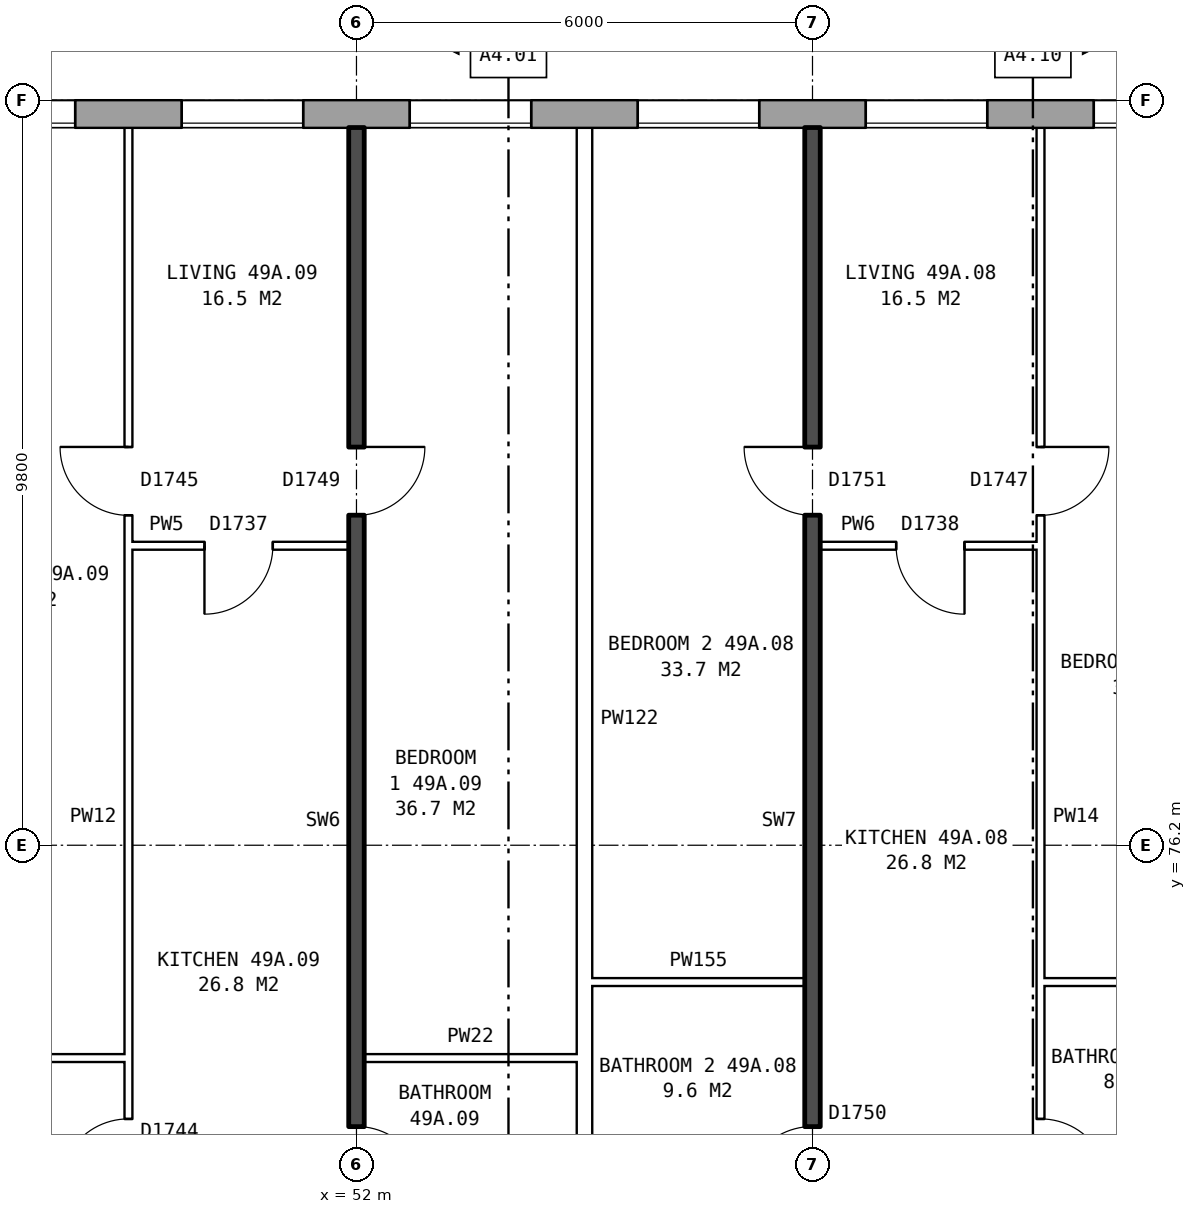
"""IFC4 building model, lengths in metres.
Left out: names, types, materials, properties, quantities, classifications, styles, units other than length and angle.
Written with IfcOpenShell. Run it as: python <this file> out.ifc"""

import sys

from ifc_helpers import new_model, si_unit, direction, frame, frame_2d, origin, place, context, subcontext, project, spatial, rectangle, extrude, element, fill, save


model = new_model("IFC4")
c1 = context("Model", 3, precision=1e-05, world=origin(), true_north=direction((0.0, 1.0)))
c2 = subcontext(c1, "Body", "Model", "MODEL_VIEW")
j1 = project(units=[si_unit("LENGTHUNIT", "METRE"), si_unit("PLANEANGLEUNIT", "RADIAN")], contexts=[c1])
p1 = place(None, origin())
s1 = spatial("IfcSite", under=j1, at=p1, CompositionType="ELEMENT")
p2 = place(p1, origin())
s2 = spatial("IfcBuilding", under=s1, at=p2, CompositionType="ELEMENT")
p3 = place(p2, frame((0.0, 0.0, 175.8)))
s3 = spatial("IfcBuildingStorey", under=s2, at=p3, CompositionType="ELEMENT", Elevation=175.8)
p4 = place(p3, frame((72.925, 85.82, 0.0), z_axis=(0.0, 0.0, 1.0), x_axis=(-1.0, 0.0, 0.0)))
e1 = element("IfcWall", 1, at=p4, inside=s3, PredefinedType="STANDARD", context=c2, shape_type="SweptSolid", body=[
    extrude(rectangle(XDim=39.601, YDim=0.36, at=frame_2d((19.8, 0.0))), origin(), (0.0, 0.0, 1.0), 2.85),
])
p5 = place(p4, frame((0.3, 0.0, 0.8)))
e2 = element("IfcOpeningElement", 2, at=p5, cuts=e1, PredefinedType="OPENING", context=c2, shape_type="SweptSolid", body=[
    extrude(rectangle(XDim=1.2, YDim=1.8, at=frame_2d((0.6, 0.9))), frame((0.0, 0.19, 0.0), z_axis=(0.0, -1.0, 0.0), x_axis=(1.0, 0.0, 0.0)), (0.0, 0.0, 1.0), 0.38),
])
p6 = place(p4, frame((3.675, 0.0, 0.8)))
e3 = element("IfcOpeningElement", 3, at=p6, cuts=e1, PredefinedType="OPENING", context=c2, shape_type="SweptSolid", body=[
    extrude(rectangle(XDim=0.6, YDim=0.9, at=frame_2d((0.3, 0.45))), frame((0.0, 0.19, 0.0), z_axis=(0.0, -1.0, 0.0), x_axis=(1.0, 0.0, 0.0)), (0.0, 0.0, 1.0), 0.38),
])
p7 = place(p4, frame((6.625, 0.0, 0.8)))
e4 = element("IfcOpeningElement", 4, at=p7, cuts=e1, PredefinedType="OPENING", context=c2, shape_type="SweptSolid", body=[
    extrude(rectangle(XDim=1.6, YDim=1.8, at=frame_2d((0.8, 0.9))), frame((0.0, 0.19, 0.0), z_axis=(0.0, -1.0, 0.0), x_axis=(1.0, 0.0, 0.0)), (0.0, 0.0, 1.0), 0.38),
])
p8 = place(p4, frame((9.625, 0.0, 0.8)))
e5 = element("IfcOpeningElement", 5, at=p8, cuts=e1, PredefinedType="OPENING", context=c2, shape_type="SweptSolid", body=[
    extrude(rectangle(XDim=1.6, YDim=1.8, at=frame_2d((0.8, 0.9))), frame((0.0, 0.19, 0.0), z_axis=(0.0, -1.0, 0.0), x_axis=(1.0, 0.0, 0.0)), (0.0, 0.0, 1.0), 0.38),
])
p9 = place(p4, frame((12.625, 0.0, 0.8)))
e6 = element("IfcOpeningElement", 6, at=p9, cuts=e1, PredefinedType="OPENING", context=c2, shape_type="SweptSolid", body=[
    extrude(rectangle(XDim=1.6, YDim=1.8, at=frame_2d((0.8, 0.9))), frame((0.0, 0.19, 0.0), z_axis=(0.0, -1.0, 0.0), x_axis=(1.0, 0.0, 0.0)), (0.0, 0.0, 1.0), 0.38),
])
p10 = place(p4, frame((15.625, 0.0, 0.8)))
e7 = element("IfcOpeningElement", 7, at=p10, cuts=e1, PredefinedType="OPENING", context=c2, shape_type="SweptSolid", body=[
    extrude(rectangle(XDim=1.6, YDim=1.8, at=frame_2d((0.8, 0.9))), frame((0.0, 0.19, 0.0), z_axis=(0.0, -1.0, 0.0), x_axis=(1.0, 0.0, 0.0)), (0.0, 0.0, 1.0), 0.38),
])
p11 = place(p4, frame((18.625, 0.0, 0.8)))
e8 = element("IfcOpeningElement", 8, at=p11, cuts=e1, PredefinedType="OPENING", context=c2, shape_type="SweptSolid", body=[
    extrude(rectangle(XDim=1.6, YDim=1.8, at=frame_2d((0.8, 0.9))), frame((0.0, 0.19, 0.0), z_axis=(0.0, -1.0, 0.0), x_axis=(1.0, 0.0, 0.0)), (0.0, 0.0, 1.0), 0.38),
])
p12 = place(p4, frame((21.625, 0.0, 0.8)))
e9 = element("IfcOpeningElement", 9, at=p12, cuts=e1, PredefinedType="OPENING", context=c2, shape_type="SweptSolid", body=[
    extrude(rectangle(XDim=1.6, YDim=1.8, at=frame_2d((0.8, 0.9))), frame((0.0, 0.19, 0.0), z_axis=(0.0, -1.0, 0.0), x_axis=(1.0, 0.0, 0.0)), (0.0, 0.0, 1.0), 0.38),
])
p13 = place(p4, frame((24.625, 0.0, 0.8)))
e10 = element("IfcOpeningElement", 10, at=p13, cuts=e1, PredefinedType="OPENING", context=c2, shape_type="SweptSolid", body=[
    extrude(rectangle(XDim=1.6, YDim=1.8, at=frame_2d((0.8, 0.9))), frame((0.0, 0.19, 0.0), z_axis=(0.0, -1.0, 0.0), x_axis=(1.0, 0.0, 0.0)), (0.0, 0.0, 1.0), 0.38),
])
p14 = place(p4, frame((27.625, 0.0, 0.8)))
e11 = element("IfcOpeningElement", 11, at=p14, cuts=e1, PredefinedType="OPENING", context=c2, shape_type="SweptSolid", body=[
    extrude(rectangle(XDim=1.6, YDim=1.8, at=frame_2d((0.8, 0.9))), frame((0.0, 0.19, 0.0), z_axis=(0.0, -1.0, 0.0), x_axis=(1.0, 0.0, 0.0)), (0.0, 0.0, 1.0), 0.38),
])
p15 = place(p4, frame((30.625, 0.0, 0.8)))
e12 = element("IfcOpeningElement", 12, at=p15, cuts=e1, PredefinedType="OPENING", context=c2, shape_type="SweptSolid", body=[
    extrude(rectangle(XDim=1.6, YDim=1.8, at=frame_2d((0.8, 0.9))), frame((0.0, 0.19, 0.0), z_axis=(0.0, -1.0, 0.0), x_axis=(1.0, 0.0, 0.0)), (0.0, 0.0, 1.0), 0.38),
])
p16 = place(p4, frame((33.625, 0.0, 0.8)))
e13 = element("IfcOpeningElement", 13, at=p16, cuts=e1, PredefinedType="OPENING", context=c2, shape_type="SweptSolid", body=[
    extrude(rectangle(XDim=1.6, YDim=1.8, at=frame_2d((0.8, 0.9))), frame((0.0, 0.19, 0.0), z_axis=(0.0, -1.0, 0.0), x_axis=(1.0, 0.0, 0.0)), (0.0, 0.0, 1.0), 0.38),
])
p17 = place(p4, frame((37.025, 0.0, 1.7)))
e14 = element("IfcOpeningElement", 14, at=p17, cuts=e1, PredefinedType="OPENING", context=c2, shape_type="SweptSolid", body=[
    extrude(rectangle(XDim=0.8, YDim=0.9, at=frame_2d((0.4, 0.45))), frame((0.0, 0.19, 0.0), z_axis=(0.0, -1.0, 0.0), x_axis=(1.0, 0.0, 0.0)), (0.0, 0.0, 1.0), 0.38),
])
p18 = place(p4, frame((1.8, 0.0, 1.6)))
e15 = element("IfcOpeningElement", 15, at=p18, cuts=e1, PredefinedType="OPENING", context=c2, shape_type="SweptSolid", body=[
    extrude(rectangle(XDim=0.6, YDim=0.9, at=frame_2d((0.3, 0.45))), frame((0.0, 0.19, 0.0), z_axis=(0.0, -1.0, 0.0), x_axis=(1.0, 0.0, 0.0)), (0.0, 0.0, 1.0), 0.38),
])
p19 = place(p4, frame((4.575, 0.0, 0.8)))
e16 = element("IfcOpeningElement", 16, at=p19, cuts=e1, PredefinedType="OPENING", context=c2, shape_type="SweptSolid", body=[
    extrude(rectangle(XDim=1.6, YDim=1.8, at=frame_2d((0.8, 0.9))), frame((0.0, 0.19, 0.0), z_axis=(0.0, -1.0, 0.0), x_axis=(1.0, 0.0, 0.0)), (0.0, 0.0, 1.0), 0.38),
])
p20 = place(p4, frame((38.125, 0.0, 0.8)))
e17 = element("IfcOpeningElement", 17, at=p20, cuts=e1, PredefinedType="OPENING", context=c2, shape_type="SweptSolid", body=[
    extrude(rectangle(XDim=0.6, YDim=1.8, at=frame_2d((0.3, 0.9))), frame((0.0, 0.19, 0.0), z_axis=(0.0, -1.0, 0.0), x_axis=(1.0, 0.0, 0.0)), (0.0, 0.0, 1.0), 0.38),
])
p21 = place(p3, frame((46.1, 73.4, 0.0), z_axis=(0.0, 0.0, 1.0), x_axis=(1.0, 0.0, 0.0)))
e18 = element("IfcWall", 18, at=p21, inside=s3, PredefinedType="PARTITIONING", context=c2, shape_type="SweptSolid", body=[
    extrude(rectangle(XDim=2.9, YDim=0.1, at=frame_2d((1.45, 0.0))), origin(), (0.0, 0.0, 1.0), 2.85),
])
for number, where, z_axis, x_axis in (
    (19, (52.1, 73.4, 0.0), (0.0, 0.0, 1.0), (1.0, 0.0, 0.0)),
    (20, (55.1, 74.4, 0.0), (0.0, 0.0, 1.0), (1.0, 0.0, 0.0)),
):
    element("IfcWall", number, at=place(p3, frame(where, z_axis=z_axis, x_axis=x_axis)), inside=s3, PredefinedType="PARTITIONING", context=c2, shape_type="SweptSolid", body=[
        extrude(rectangle(XDim=2.8, YDim=0.1, at=frame_2d((1.4, 0.0))), origin(), (0.0, 0.0, 1.0), 2.85),
    ])
p22 = place(p3, frame((61.0, 74.4, 0.0), z_axis=(0.0, 0.0, 1.0), x_axis=(1.0, 0.0, 0.0)))
e21 = element("IfcWall", 21, at=p22, inside=s3, PredefinedType="PARTITIONING", context=c2, shape_type="SweptSolid", body=[
    extrude(rectangle(XDim=2.64, YDim=0.1, at=frame_2d((1.32, 0.0))), origin(), (0.0, 0.0, 1.0), 2.85),
])
p23 = place(p3, frame((49.0, 80.14, 0.0), z_axis=(0.0, 0.0, 1.0), x_axis=(1.0, 0.0, 0.0)))
e22 = element("IfcWall", 22, at=p23, inside=s3, PredefinedType="PARTITIONING", context=c2, shape_type="SweptSolid", body=[
    extrude(rectangle(XDim=2.9, YDim=0.1, at=frame_2d((1.45, 0.0))), origin(), (0.0, 0.0, 1.0), 2.85),
])
p24 = place(p23, frame((1.0, 0.0, 0.0)))
e23 = element("IfcOpeningElement", 23, at=p24, cuts=e22, PredefinedType="OPENING", context=c2, shape_type="SweptSolid", body=[
    extrude(rectangle(XDim=0.9, YDim=2.1, at=frame_2d((0.45, 1.05))), frame((0.0, 0.06, 0.0), z_axis=(0.0, -1.0, 0.0), x_axis=(1.0, 0.0, 0.0)), (0.0, 0.0, 1.0), 0.12),
])
p25 = place(p3, frame((58.1, 80.14, 0.0), z_axis=(0.0, 0.0, 1.0), x_axis=(1.0, 0.0, 0.0)))
e24 = element("IfcWall", 24, at=p25, inside=s3, PredefinedType="PARTITIONING", context=c2, shape_type="SweptSolid", body=[
    extrude(rectangle(XDim=2.9, YDim=0.1, at=frame_2d((1.45, 0.0))), origin(), (0.0, 0.0, 1.0), 2.85),
])
p26 = place(p25, frame((1.0, 0.0, 0.0)))
e25 = element("IfcOpeningElement", 25, at=p26, cuts=e24, PredefinedType="OPENING", context=c2, shape_type="SweptSolid", body=[
    extrude(rectangle(XDim=0.9, YDim=2.1, at=frame_2d((0.45, 1.05))), frame((0.0, 0.06, 0.0), z_axis=(0.0, -1.0, 0.0), x_axis=(1.0, 0.0, 0.0)), (0.0, 0.0, 1.0), 0.12),
])
p27 = place(p3, frame((49.0, 71.3, 0.0), z_axis=(0.0, 0.0, 1.0), x_axis=(0.0, 1.0, 0.0)))
e26 = element("IfcWall", 26, at=p27, inside=s3, PredefinedType="PARTITIONING", context=c2, shape_type="SweptSolid", body=[
    extrude(rectangle(XDim=14.34, YDim=0.1, at=frame_2d((7.17, 0.0))), origin(), (0.0, 0.0, 1.0), 2.85),
])
p28 = place(p27, frame((9.24, 0.0, 0.0)))
e27 = element("IfcOpeningElement", 27, at=p28, cuts=e26, PredefinedType="OPENING", context=c2, shape_type="SweptSolid", body=[
    extrude(rectangle(XDim=0.9, YDim=2.1, at=frame_2d((0.45, 1.05))), frame((0.0, 0.06, 0.0), z_axis=(0.0, -1.0, 0.0), x_axis=(1.0, 0.0, 0.0)), (0.0, 0.0, 1.0), 0.12),
])
p29 = place(p27, frame((0.4, 0.0, 0.0)))
e28 = element("IfcOpeningElement", 28, at=p29, cuts=e26, PredefinedType="OPENING", context=c2, shape_type="SweptSolid", body=[
    extrude(rectangle(XDim=0.9, YDim=2.1, at=frame_2d((0.45, 1.05))), frame((0.0, 0.06, 0.0), z_axis=(0.0, -1.0, 0.0), x_axis=(1.0, 0.0, 0.0)), (0.0, 0.0, 1.0), 0.12),
])
p30 = place(p3, frame((52.0, 71.2, 0.0), z_axis=(0.0, 0.0, 1.0), x_axis=(0.0, 1.0, 0.0)))
e29 = element("IfcWall", 29, at=p30, inside=s3, PredefinedType="SOLIDWALL", context=c2, shape_type="SweptSolid", body=[
    extrude(rectangle(XDim=14.44, YDim=0.2, at=frame_2d((7.22, 0.0))), origin(), (0.0, 0.0, 1.0), 2.85),
])
p31 = place(p30, frame((9.34, 0.0, 0.0)))
e30 = element("IfcOpeningElement", 30, at=p31, cuts=e29, PredefinedType="OPENING", context=c2, shape_type="SweptSolid", body=[
    extrude(rectangle(XDim=0.9, YDim=2.1, at=frame_2d((0.45, 1.05))), frame((0.0, 0.11, 0.0), z_axis=(0.0, -1.0, 0.0), x_axis=(1.0, 0.0, 0.0)), (0.0, 0.0, 1.0), 0.22),
])
p32 = place(p30, frame((0.4, 0.0, 0.0)))
e31 = element("IfcOpeningElement", 31, at=p32, cuts=e29, PredefinedType="OPENING", context=c2, shape_type="SweptSolid", body=[
    extrude(rectangle(XDim=0.9, YDim=2.1, at=frame_2d((0.45, 1.05))), frame((0.0, 0.11, 0.0), z_axis=(0.0, -1.0, 0.0), x_axis=(1.0, 0.0, 0.0)), (0.0, 0.0, 1.0), 0.22),
])
p33 = place(p3, frame((55.0, 71.3, 0.0), z_axis=(0.0, 0.0, 1.0), x_axis=(0.0, 1.0, 0.0)))
e32 = element("IfcWall", 32, at=p33, inside=s3, PredefinedType="PARTITIONING", context=c2, shape_type="SweptSolid", body=[
    extrude(rectangle(XDim=14.34, YDim=0.2, at=frame_2d((7.17, 0.0))), origin(), (0.0, 0.0, 1.0), 2.85),
])
p34 = place(p3, frame((58.0, 71.2, 0.0), z_axis=(0.0, 0.0, 1.0), x_axis=(0.0, 1.0, 0.0)))
e33 = element("IfcWall", 33, at=p34, inside=s3, PredefinedType="SOLIDWALL", context=c2, shape_type="SweptSolid", body=[
    extrude(rectangle(XDim=14.44, YDim=0.2, at=frame_2d((7.22, 0.0))), origin(), (0.0, 0.0, 1.0), 2.85),
])
p35 = place(p34, frame((9.34, 0.0, 0.0)))
e34 = element("IfcOpeningElement", 34, at=p35, cuts=e33, PredefinedType="OPENING", context=c2, shape_type="SweptSolid", body=[
    extrude(rectangle(XDim=0.9, YDim=2.1, at=frame_2d((0.45, 1.05))), frame((0.0, 0.11, 0.0), z_axis=(0.0, -1.0, 0.0), x_axis=(1.0, 0.0, 0.0)), (0.0, 0.0, 1.0), 0.22),
])
p36 = place(p34, frame((0.4, 0.0, 0.0)))
e35 = element("IfcOpeningElement", 35, at=p36, cuts=e33, PredefinedType="OPENING", context=c2, shape_type="SweptSolid", body=[
    extrude(rectangle(XDim=0.9, YDim=2.1, at=frame_2d((0.45, 1.05))), frame((0.0, 0.11, 0.0), z_axis=(0.0, -1.0, 0.0), x_axis=(1.0, 0.0, 0.0)), (0.0, 0.0, 1.0), 0.22),
])
p37 = place(p3, frame((61.0, 71.3, 0.0), z_axis=(0.0, 0.0, 1.0), x_axis=(0.0, 1.0, 0.0)))
e36 = element("IfcWall", 36, at=p37, inside=s3, PredefinedType="PARTITIONING", context=c2, shape_type="SweptSolid", body=[
    extrude(rectangle(XDim=14.34, YDim=0.1, at=frame_2d((7.17, 0.0))), origin(), (0.0, 0.0, 1.0), 2.85),
])
p38 = place(p37, frame((9.24, 0.0, 0.0)))
e37 = element("IfcOpeningElement", 37, at=p38, cuts=e36, PredefinedType="OPENING", context=c2, shape_type="SweptSolid", body=[
    extrude(rectangle(XDim=0.9, YDim=2.1, at=frame_2d((0.45, 1.05))), frame((0.0, 0.06, 0.0), z_axis=(0.0, -1.0, 0.0), x_axis=(1.0, 0.0, 0.0)), (0.0, 0.0, 1.0), 0.12),
])
p39 = place(p37, frame((0.4, 0.0, 0.0)))
e38 = element("IfcOpeningElement", 38, at=p39, cuts=e36, PredefinedType="OPENING", context=c2, shape_type="SweptSolid", body=[
    extrude(rectangle(XDim=0.9, YDim=2.1, at=frame_2d((0.45, 1.05))), frame((0.0, 0.06, 0.0), z_axis=(0.0, -1.0, 0.0), x_axis=(1.0, 0.0, 0.0)), (0.0, 0.0, 1.0), 0.12),
])
p40 = place(p8, origin())
e39 = element("IfcWindow", 39, at=p40, inside=s3, PartitioningType="SINGLE_PANEL", PredefinedType="WINDOW", context=c2, shape_type="SweptSolid", body=[
    extrude(rectangle(XDim=1.6, YDim=1.8, at=frame_2d((0.8, 0.9))), frame((0.0, 0.15, 0.0), z_axis=(0.0, -1.0, 0.0), x_axis=(1.0, 0.0, 0.0)), (0.0, 0.0, 1.0), 0.06),
])
fill(e5, e39)
p41 = place(p9, origin())
e40 = element("IfcWindow", 40, at=p41, inside=s3, PartitioningType="SINGLE_PANEL", PredefinedType="WINDOW", context=c2, shape_type="SweptSolid", body=[
    extrude(rectangle(XDim=1.6, YDim=1.8, at=frame_2d((0.8, 0.9))), frame((0.0, 0.15, 0.0), z_axis=(0.0, -1.0, 0.0), x_axis=(1.0, 0.0, 0.0)), (0.0, 0.0, 1.0), 0.06),
])
fill(e6, e40)
p42 = place(p10, origin())
e41 = element("IfcWindow", 41, at=p42, inside=s3, PartitioningType="SINGLE_PANEL", PredefinedType="WINDOW", context=c2, shape_type="SweptSolid", body=[
    extrude(rectangle(XDim=1.6, YDim=1.8, at=frame_2d((0.8, 0.9))), frame((0.0, 0.15, 0.0), z_axis=(0.0, -1.0, 0.0), x_axis=(1.0, 0.0, 0.0)), (0.0, 0.0, 1.0), 0.06),
])
fill(e7, e41)
p43 = place(p11, origin())
e42 = element("IfcWindow", 42, at=p43, inside=s3, PartitioningType="SINGLE_PANEL", PredefinedType="WINDOW", context=c2, shape_type="SweptSolid", body=[
    extrude(rectangle(XDim=1.6, YDim=1.8, at=frame_2d((0.8, 0.9))), frame((0.0, 0.15, 0.0), z_axis=(0.0, -1.0, 0.0), x_axis=(1.0, 0.0, 0.0)), (0.0, 0.0, 1.0), 0.06),
])
fill(e8, e42)
p44 = place(p12, origin())
e43 = element("IfcWindow", 43, at=p44, inside=s3, PartitioningType="SINGLE_PANEL", PredefinedType="WINDOW", context=c2, shape_type="SweptSolid", body=[
    extrude(rectangle(XDim=1.6, YDim=1.8, at=frame_2d((0.8, 0.9))), frame((0.0, 0.15, 0.0), z_axis=(0.0, -1.0, 0.0), x_axis=(1.0, 0.0, 0.0)), (0.0, 0.0, 1.0), 0.06),
])
fill(e9, e43)
p45 = place(p13, origin())
e44 = element("IfcWindow", 44, at=p45, inside=s3, PartitioningType="SINGLE_PANEL", PredefinedType="WINDOW", context=c2, shape_type="SweptSolid", body=[
    extrude(rectangle(XDim=1.6, YDim=1.8, at=frame_2d((0.8, 0.9))), frame((0.0, 0.15, 0.0), z_axis=(0.0, -1.0, 0.0), x_axis=(1.0, 0.0, 0.0)), (0.0, 0.0, 1.0), 0.06),
])
fill(e10, e44)
p46 = place(p38, frame((0.9, 0.0, 0.0), z_axis=(0.0, 0.0, 1.0), x_axis=(-1.0, 0.0, 0.0)))
e45 = element("IfcDoor", 45, at=p46, inside=s3, OperationType="SINGLE_SWING_LEFT", PredefinedType="DOOR", context=c2, shape_type="SweptSolid", body=[
    extrude(rectangle(XDim=0.9, YDim=2.1, at=frame_2d((0.45, 1.05))), frame((0.0, 0.025, 0.0), z_axis=(0.0, -1.0, 0.0), x_axis=(1.0, 0.0, 0.0)), (0.0, 0.0, 1.0), 0.05),
])
fill(e37, e45)
p47 = place(p35, origin())
e46 = element("IfcDoor", 46, at=p47, inside=s3, OperationType="SINGLE_SWING_RIGHT", PredefinedType="DOOR", context=c2, shape_type="SweptSolid", body=[
    extrude(rectangle(XDim=0.9, YDim=2.1, at=frame_2d((0.45, 1.05))), frame((0.0, 0.025, 0.0), z_axis=(0.0, -1.0, 0.0), x_axis=(1.0, 0.0, 0.0)), (0.0, 0.0, 1.0), 0.05),
])
fill(e34, e46)
p48 = place(p26, frame((0.9, 0.0, 0.0), z_axis=(0.0, 0.0, 1.0), x_axis=(-1.0, 0.0, 0.0)))
e47 = element("IfcDoor", 47, at=p48, inside=s3, OperationType="SINGLE_SWING_LEFT", PredefinedType="DOOR", context=c2, shape_type="SweptSolid", body=[
    extrude(rectangle(XDim=0.9, YDim=2.1, at=frame_2d((0.45, 1.05))), frame((0.0, 0.025, 0.0), z_axis=(0.0, -1.0, 0.0), x_axis=(1.0, 0.0, 0.0)), (0.0, 0.0, 1.0), 0.05),
])
fill(e25, e47)
p49 = place(p39, frame((0.9, 0.0, 0.0), z_axis=(0.0, 0.0, 1.0), x_axis=(-1.0, 0.0, 0.0)))
e48 = element("IfcDoor", 48, at=p49, inside=s3, OperationType="SINGLE_SWING_RIGHT", PredefinedType="DOOR", context=c2, shape_type="SweptSolid", body=[
    extrude(rectangle(XDim=0.9, YDim=2.1, at=frame_2d((0.45, 1.05))), frame((0.0, 0.025, 0.0), z_axis=(0.0, -1.0, 0.0), x_axis=(1.0, 0.0, 0.0)), (0.0, 0.0, 1.0), 0.05),
])
fill(e38, e48)
p50 = place(p36, origin())
e49 = element("IfcDoor", 49, at=p50, inside=s3, OperationType="SINGLE_SWING_LEFT", PredefinedType="DOOR", context=c2, shape_type="SweptSolid", body=[
    extrude(rectangle(XDim=0.9, YDim=2.1, at=frame_2d((0.45, 1.05))), frame((0.0, 0.025, 0.0), z_axis=(0.0, -1.0, 0.0), x_axis=(1.0, 0.0, 0.0)), (0.0, 0.0, 1.0), 0.05),
])
fill(e35, e49)
p51 = place(p31, frame((0.9, 0.0, 0.0), z_axis=(0.0, 0.0, 1.0), x_axis=(-1.0, 0.0, 0.0)))
e50 = element("IfcDoor", 50, at=p51, inside=s3, OperationType="SINGLE_SWING_LEFT", PredefinedType="DOOR", context=c2, shape_type="SweptSolid", body=[
    extrude(rectangle(XDim=0.9, YDim=2.1, at=frame_2d((0.45, 1.05))), frame((0.0, 0.025, 0.0), z_axis=(0.0, -1.0, 0.0), x_axis=(1.0, 0.0, 0.0)), (0.0, 0.0, 1.0), 0.05),
])
fill(e30, e50)
p52 = place(p28, origin())
e51 = element("IfcDoor", 51, at=p52, inside=s3, OperationType="SINGLE_SWING_RIGHT", PredefinedType="DOOR", context=c2, shape_type="SweptSolid", body=[
    extrude(rectangle(XDim=0.9, YDim=2.1, at=frame_2d((0.45, 1.05))), frame((0.0, 0.025, 0.0), z_axis=(0.0, -1.0, 0.0), x_axis=(1.0, 0.0, 0.0)), (0.0, 0.0, 1.0), 0.05),
])
fill(e27, e51)
p53 = place(p24, frame((0.9, 0.0, 0.0), z_axis=(0.0, 0.0, 1.0), x_axis=(-1.0, 0.0, 0.0)))
e52 = element("IfcDoor", 52, at=p53, inside=s3, OperationType="SINGLE_SWING_RIGHT", PredefinedType="DOOR", context=c2, shape_type="SweptSolid", body=[
    extrude(rectangle(XDim=0.9, YDim=2.1, at=frame_2d((0.45, 1.05))), frame((0.0, 0.025, 0.0), z_axis=(0.0, -1.0, 0.0), x_axis=(1.0, 0.0, 0.0)), (0.0, 0.0, 1.0), 0.05),
])
fill(e23, e52)
p54 = place(p32, frame((0.9, 0.0, 0.0), z_axis=(0.0, 0.0, 1.0), x_axis=(-1.0, 0.0, 0.0)))
e53 = element("IfcDoor", 53, at=p54, inside=s3, OperationType="SINGLE_SWING_RIGHT", PredefinedType="DOOR", context=c2, shape_type="SweptSolid", body=[
    extrude(rectangle(XDim=0.9, YDim=2.1, at=frame_2d((0.45, 1.05))), frame((0.0, 0.025, 0.0), z_axis=(0.0, -1.0, 0.0), x_axis=(1.0, 0.0, 0.0)), (0.0, 0.0, 1.0), 0.05),
])
fill(e31, e53)
p55 = place(p29, origin())
e54 = element("IfcDoor", 54, at=p55, inside=s3, OperationType="SINGLE_SWING_LEFT", PredefinedType="DOOR", context=c2, shape_type="SweptSolid", body=[
    extrude(rectangle(XDim=0.9, YDim=2.1, at=frame_2d((0.45, 1.05))), frame((0.0, 0.025, 0.0), z_axis=(0.0, -1.0, 0.0), x_axis=(1.0, 0.0, 0.0)), (0.0, 0.0, 1.0), 0.05),
])
fill(e28, e54)
save(model, sys.argv[1])
